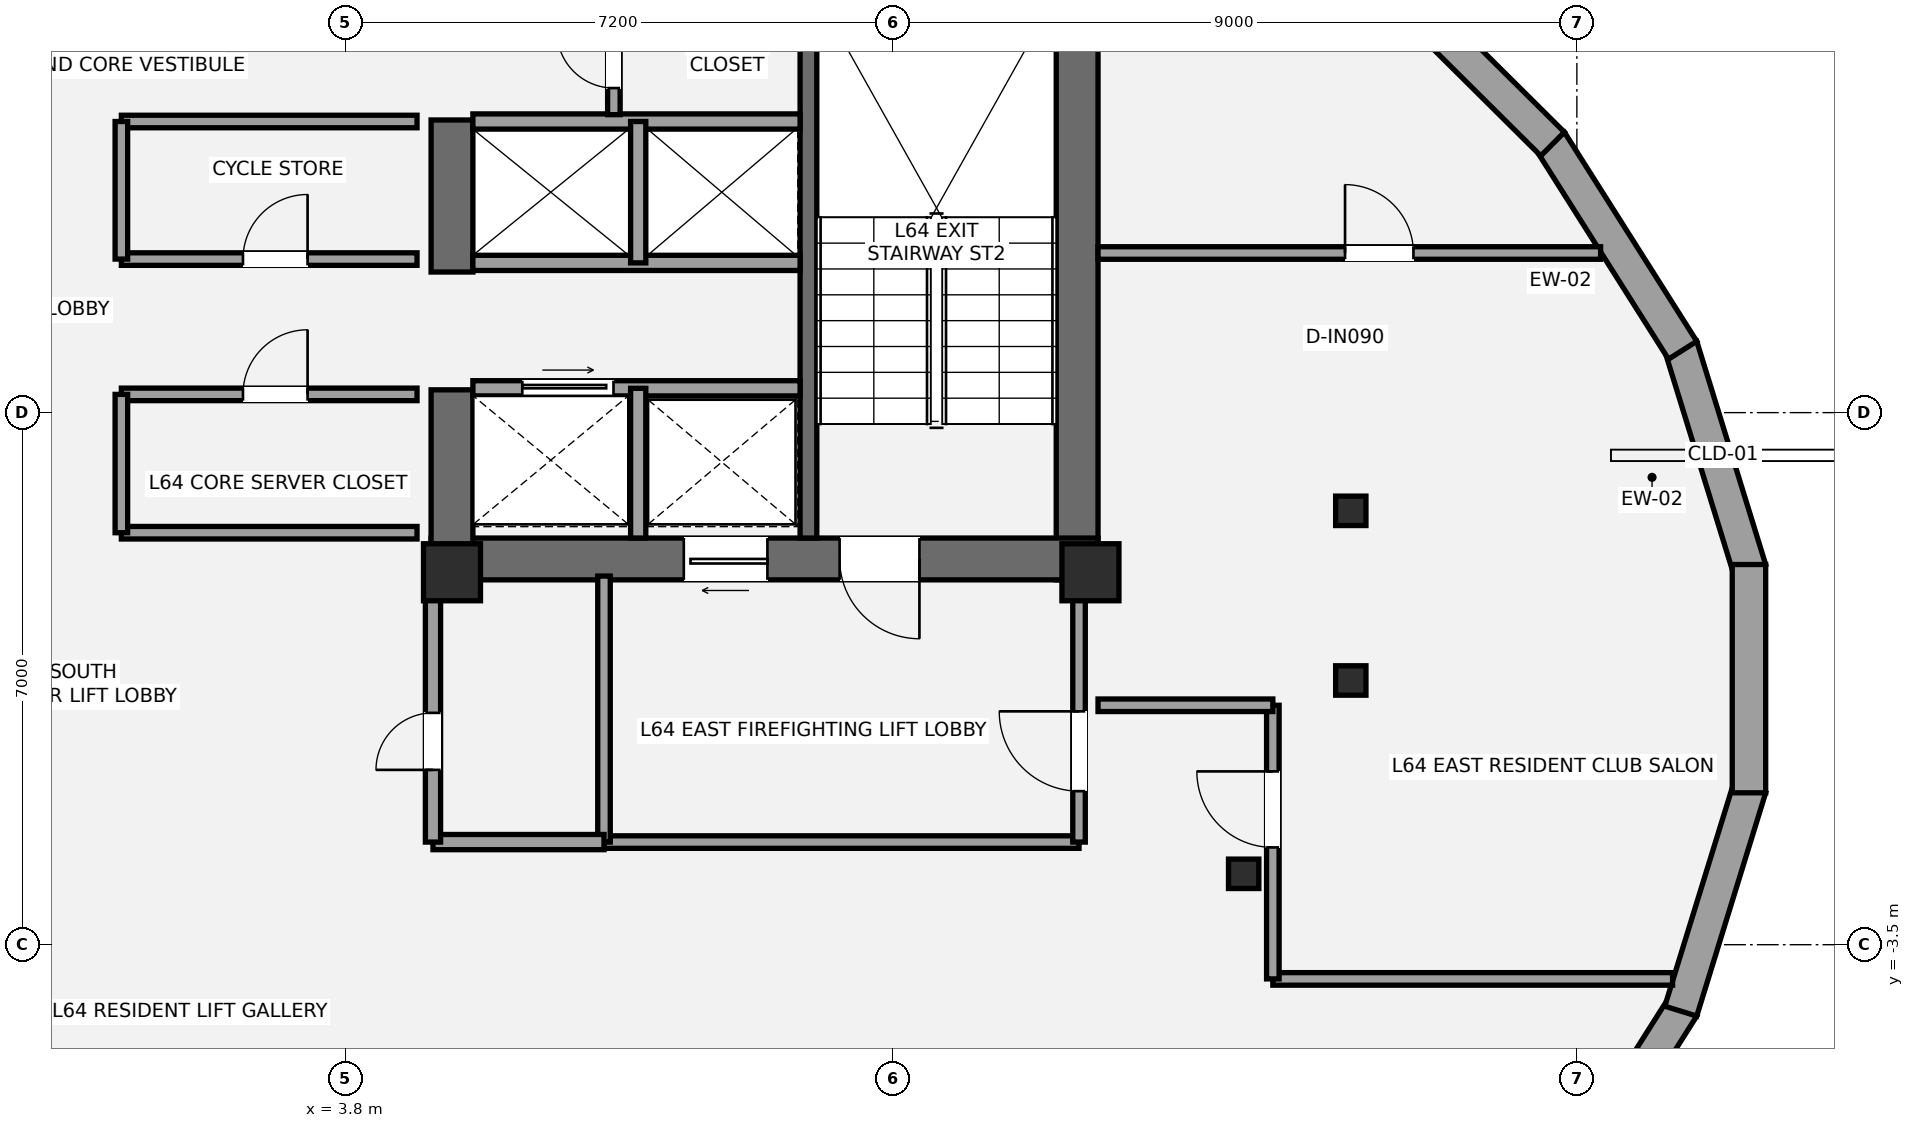
"""IFC4 building model, lengths in metres.
Left out: names, types, materials, properties, quantities, classifications, styles, units other than length and angle.
Written with IfcOpenShell. Run it as: python <this file> out.ifc"""

import sys

from ifc_helpers import new_model, si_unit, direction, frame, frame_2d, origin, origin_2d, place, context, subcontext, project, spatial, rectangle, i_section, extrude, element, fill, save


model = new_model("IFC4")
c1 = context("Model", 3, precision=1e-05, world=origin(), true_north=direction((0.0, 1.0)))
c2 = subcontext(c1, "Body", "Model", "MODEL_VIEW")
j1 = project(units=[si_unit("LENGTHUNIT", "METRE"), si_unit("PLANEANGLEUNIT", "RADIAN")], contexts=[c1])
p1 = place(None, origin())
s1 = spatial("IfcSite", under=j1, at=p1, CompositionType="ELEMENT")
p2 = place(p1, origin())
s2 = spatial("IfcBuilding", under=s1, at=p2, CompositionType="ELEMENT")
p3 = place(p2, frame((0.0, 0.0, 228.9)))
s3 = spatial("IfcBuildingStorey", under=s2, at=p3, CompositionType="ELEMENT", Elevation=228.9)
p4 = place(p3, frame((13.425, 1.3, 0.0), z_axis=(0.0, 0.0, 1.0), x_axis=(0.0, 1.0, 0.0)))
e1 = element("IfcWall", 1, at=p4, inside=s3, PredefinedType="SHEAR", context=c2, shape_type="SweptSolid", body=[
    extrude(rectangle(XDim=8.25, YDim=0.55, at=frame_2d((4.125, 0.0))), origin(), (0.0, 0.0, 1.0), 3.15),
])
p5 = place(p3, frame((13.7, 1.575, 0.0), z_axis=(0.0, 0.0, 1.0), x_axis=(-1.0, 0.0, 0.0)))
e2 = element("IfcWall", 2, at=p5, inside=s3, PredefinedType="SHEAR", context=c2, shape_type="SweptSolid", body=[
    extrude(rectangle(XDim=8.775, YDim=0.55, at=frame_2d((4.387, 0.0))), origin(), (0.0, 0.0, 1.0), 3.15),
])
p6 = place(p5, frame((2.35, 0.0, 0.0)))
e3 = element("IfcOpeningElement", 3, at=p6, cuts=e2, PredefinedType="OPENING", context=c2, shape_type="SweptSolid", body=[
    extrude(rectangle(XDim=1.05, YDim=2.15, at=frame_2d((0.525, 1.075))), frame((0.0, 0.285, 0.0), z_axis=(0.0, -1.0, 0.0), x_axis=(1.0, 0.0, 0.0)), (0.0, 0.0, 1.0), 0.57),
])
p7 = place(p5, frame((4.35, 0.0, 0.0)))
e4 = element("IfcOpeningElement", 4, at=p7, cuts=e2, PredefinedType="OPENING", context=c2, shape_type="SweptSolid", body=[
    extrude(rectangle(XDim=1.1, YDim=2.2, at=frame_2d((0.55, 1.1))), frame((0.0, 0.285, 0.0), z_axis=(0.0, -1.0, 0.0), x_axis=(1.0, 0.0, 0.0)), (0.0, 0.0, 1.0), 0.57),
])
p8 = place(p3, frame((5.2, 1.3, 0.0), z_axis=(0.0, 0.0, 1.0), x_axis=(0.0, 1.0, 0.0)))
e5 = element("IfcWall", 5, at=p8, inside=s3, PredefinedType="SHEAR", context=c2, shape_type="SweptSolid", body=[
    extrude(rectangle(XDim=2.5, YDim=0.55, at=frame_2d((1.25, 0.0))), origin(), (0.0, 0.0, 1.0), 3.15),
])
p9 = place(p3, frame((5.2, 5.35, 0.0), z_axis=(0.0, 0.0, 1.0), x_axis=(0.0, 1.0, 0.0)))
e6 = element("IfcWall", 6, at=p9, inside=s3, PredefinedType="SHEAR", context=c2, shape_type="SweptSolid", body=[
    extrude(rectangle(XDim=2.0, YDim=0.55, at=frame_2d((1.0, 0.0))), origin(), (0.0, 0.0, 1.0), 3.15),
])
p10 = place(p3, frame((9.89, 1.85, 0.0), z_axis=(0.0, 0.0, 1.0), x_axis=(0.0, 1.0, 0.0)))
e7 = element("IfcWall", 7, at=p10, inside=s3, PredefinedType="SHEAR", context=c2, shape_type="SweptSolid", body=[
    extrude(rectangle(XDim=7.15, YDim=0.22, at=frame_2d((3.575, 0.0))), origin(), (0.0, 0.0, 1.0), 3.15),
])
for number, where, z_axis, x_axis in (
    (8, (5.2, 1.4, 0.0), (0.0, 0.0, 1.0), (1.0, 0.0, 0.0)),
    (9, (13.6, 1.4, 0.0), (0.0, 0.0, 1.0), (1.0, 0.0, 0.0)),
):
    element("IfcColumn", number, at=place(p3, frame(where, z_axis=z_axis, x_axis=x_axis)), inside=s3, PredefinedType="PILASTER", context=c2, shape_type="SweptSolid", body=[
        extrude(rectangle(XDim=0.75, YDim=0.75, at=origin_2d()), origin(), (0.0, 0.0, 1.0), 3.15),
    ])
for number, where, z_axis, x_axis in (
    (10, (17.026, 2.208, 0.0), (0.0, 0.0, 1.0), (1.0, 0.0, 0.0)),
    (11, (15.616, -2.567, 0.0), (0.0, 0.0, 1.0), (1.0, 0.0, 0.0)),
    (12, (17.026, -0.024, 0.0), (0.0, 0.0, 1.0), (1.0, 0.0, 0.0)),
):
    element("IfcColumn", number, at=place(p3, frame(where, z_axis=z_axis, x_axis=x_axis)), inside=s3, PredefinedType="COLUMN", context=c2, shape_type="SweptSolid", body=[
        extrude(i_section(OverallWidth=0.399, OverallDepth=0.387, WebThickness=0.021, FlangeThickness=0.033, at=origin_2d()), origin(), (0.0, 0.0, 1.0), 3.15),
    ])
p11 = place(p3, frame((21.367, 4.374, 0.0), z_axis=(0.0, 0.0, 1.0), x_axis=(0.295012279945, -0.95549346135, 0.0)))
e13 = element("IfcWall", 13, at=p11, inside=s3, PredefinedType="STANDARD", context=c2, shape_type="SweptSolid", body=[
    extrude(rectangle(XDim=3.073, YDim=0.44, at=frame_2d((1.537, 0.0))), origin(), (0.0, 0.0, 1.0), 2.336),
])
p12 = place(p3, frame((19.65, 7.073, 0.0), z_axis=(0.0, 0.0, 1.0), x_axis=(0.53485586517, -0.844943313775, 0.0)))
e14 = element("IfcWall", 14, at=p12, inside=s3, PredefinedType="STANDARD", context=c2, shape_type="SweptSolid", body=[
    extrude(rectangle(XDim=3.256, YDim=0.44, at=frame_2d((1.628, 0.0))), origin(), (0.0, 0.0, 1.0), 2.336),
])
p13 = place(p3, frame((17.197, 9.501, 0.0), z_axis=(0.0, 0.0, 1.0), x_axis=(0.709543258305, -0.704661879623, 0.0)))
e15 = element("IfcWall", 15, at=p13, inside=s3, PredefinedType="STANDARD", context=c2, shape_type="SweptSolid", body=[
    extrude(rectangle(XDim=3.501, YDim=0.44, at=frame_2d((1.75, 0.0))), origin(), (0.0, 0.0, 1.0), 2.336),
])
p14 = place(p3, frame((21.392, -4.321, 0.0), z_axis=(0.0, 0.0, 1.0), x_axis=(-0.53485586517, -0.844943313775, 0.0)))
e16 = element("IfcWall", 16, at=p14, inside=s3, PredefinedType="STANDARD", context=c2, shape_type="SweptSolid", body=[
    extrude(rectangle(XDim=3.256, YDim=0.44, at=frame_2d((1.628, 0.0))), origin(), (0.0, 0.0, 1.0), 2.336),
])
p15 = place(p3, frame((22.274, -1.437, 0.0), z_axis=(0.0, 0.0, 1.0), x_axis=(-0.295012279945, -0.95549346135, 0.0)))
e17 = element("IfcWall", 17, at=p15, inside=s3, PredefinedType="STANDARD", context=c2, shape_type="SweptSolid", body=[
    extrude(rectangle(XDim=3.073, YDim=0.44, at=frame_2d((1.537, 0.0))), origin(), (0.0, 0.0, 1.0), 2.336),
])
p16 = place(p3, frame((22.264, 1.502, 0.0), z_axis=(0.0, 0.0, 1.0), x_axis=(0.0, -1.0, 0.0)))
e18 = element("IfcWall", 18, at=p16, inside=s3, PredefinedType="STANDARD", context=c2, shape_type="SweptSolid", body=[
    extrude(rectangle(XDim=3.003, YDim=0.44, at=frame_2d((1.502, 0.0))), origin(), (0.0, 0.0, 1.0), 2.336),
])
p17 = place(p3, frame((7.2, -2.15, 0.0), z_axis=(0.0, 0.0, 1.0), x_axis=(1.0, 0.0, 0.0)))
e19 = element("IfcWall", 19, at=p17, inside=s3, PredefinedType="PARTITIONING", context=c2, shape_type="SweptSolid", body=[
    extrude(rectangle(XDim=6.25, YDim=0.165, at=frame_2d((3.125, 0.0))), origin(), (0.0, 0.0, 1.0), 2.97),
])
p18 = place(p3, frame((7.2, -2.15, 0.0), z_axis=(0.0, 0.0, 1.0), x_axis=(0.0, 1.0, 0.0)))
e20 = element("IfcWall", 20, at=p18, inside=s3, PredefinedType="PARTITIONING", context=c2, shape_type="SweptSolid", body=[
    extrude(rectangle(XDim=3.5, YDim=0.165, at=frame_2d((1.75, 0.0))), origin(), (0.0, 0.0, 1.0), 2.423),
])
p19 = place(p3, frame((13.45, -2.15, 0.0), z_axis=(0.0, 0.0, 1.0), x_axis=(0.0, 1.0, 0.0)))
e21 = element("IfcWall", 21, at=p19, inside=s3, PredefinedType="PARTITIONING", context=c2, shape_type="SweptSolid", body=[
    extrude(rectangle(XDim=3.5, YDim=0.165, at=frame_2d((1.75, 0.0))), origin(), (0.0, 0.0, 1.0), 2.423),
])
p20 = place(p19, frame((0.67, 0.0, 0.0)))
e22 = element("IfcOpeningElement", 22, at=p20, cuts=e21, PredefinedType="OPENING", context=c2, shape_type="SweptSolid", body=[
    extrude(rectangle(XDim=1.05, YDim=2.15, at=frame_2d((0.525, 1.075))), frame((0.0, 0.093, 0.0), z_axis=(0.0, -1.0, 0.0), x_axis=(1.0, 0.0, 0.0)), (0.0, 0.0, 1.0), 0.185),
])
p21 = place(p3, frame((4.95, -2.15, 0.0), z_axis=(0.0, 0.0, 1.0), x_axis=(1.0, 0.0, 0.0)))
e23 = element("IfcWall", 23, at=p21, inside=s3, PredefinedType="SOLIDWALL", context=c2, shape_type="SweptSolid", body=[
    extrude(rectangle(XDim=2.25, YDim=0.2, at=frame_2d((1.125, 0.0))), origin(), (0.0, 0.0, 1.0), 2.97),
])
p22 = place(p3, frame((4.95, -2.15, 0.0), z_axis=(0.0, 0.0, 1.0), x_axis=(0.0, 1.0, 0.0)))
e24 = element("IfcWall", 24, at=p22, inside=s3, PredefinedType="SOLIDWALL", context=c2, shape_type="SweptSolid", body=[
    extrude(rectangle(XDim=3.5, YDim=0.2, at=frame_2d((1.75, 0.0))), origin(), (0.0, 0.0, 1.0), 2.423),
])
p23 = place(p22, frame((0.95, 0.0, 0.0)))
e25 = element("IfcOpeningElement", 25, at=p23, cuts=e24, PredefinedType="OPENING", context=c2, shape_type="SweptSolid", body=[
    extrude(rectangle(XDim=0.75, YDim=2.1, at=frame_2d((0.375, 1.05))), frame((0.0, 0.11, 0.0), z_axis=(0.0, -1.0, 0.0), x_axis=(1.0, 0.0, 0.0)), (0.0, 0.0, 1.0), 0.22),
])
p24 = place(p3, frame((5.475, 3.82, 0.0), z_axis=(0.0, 0.0, 1.0), x_axis=(1.0, 0.0, 0.0)))
e26 = element("IfcWall", 26, at=p24, inside=s3, PredefinedType="SOLIDWALL", context=c2, shape_type="SweptSolid", body=[
    extrude(rectangle(XDim=4.305, YDim=0.2, at=frame_2d((2.152, 0.0))), origin(), (0.0, 0.0, 1.0), 2.97),
])
p25 = place(p24, frame((0.65, 0.0, 0.0)))
e27 = element("IfcOpeningElement", 27, at=p25, cuts=e26, PredefinedType="OPENING", context=c2, shape_type="SweptSolid", body=[
    extrude(rectangle(XDim=1.2, YDim=2.2, at=frame_2d((0.6, 1.1))), frame((0.0, 0.11, 0.0), z_axis=(0.0, -1.0, 0.0), x_axis=(1.0, 0.0, 0.0)), (0.0, 0.0, 1.0), 0.22),
])
p26 = place(p3, frame((7.65, 1.85, 0.0), z_axis=(0.0, 0.0, 1.0), x_axis=(0.0, 1.0, 0.0)))
e28 = element("IfcWall", 28, at=p26, inside=s3, PredefinedType="SOLIDWALL", context=c2, shape_type="SweptSolid", body=[
    extrude(rectangle(XDim=1.97, YDim=0.2, at=frame_2d((0.985, 0.0))), origin(), (0.0, 0.0, 1.0), 2.97),
])
for number, where, z_axis, x_axis in (
    (29, (5.475, 5.47, 0.0), (0.0, 0.0, 1.0), (1.0, 0.0, 0.0)),
    (30, (5.475, 7.33, 0.0), (0.0, 0.0, 1.0), (1.0, 0.0, 0.0)),
):
    element("IfcWall", number, at=place(p3, frame(where, z_axis=z_axis, x_axis=x_axis)), inside=s3, PredefinedType="SOLIDWALL", context=c2, shape_type="SweptSolid", body=[
        extrude(rectangle(XDim=4.305, YDim=0.2, at=frame_2d((2.152, 0.0))), origin(), (0.0, 0.0, 1.0), 2.97),
    ])
p27 = place(p3, frame((7.65, 5.47, 0.0), z_axis=(0.0, 0.0, 1.0), x_axis=(0.0, 1.0, 0.0)))
e31 = element("IfcWall", 31, at=p27, inside=s3, PredefinedType="SOLIDWALL", context=c2, shape_type="SweptSolid", body=[
    extrude(rectangle(XDim=1.86, YDim=0.2, at=frame_2d((0.93, 0.0))), origin(), (0.0, 0.0, 1.0), 2.97),
])
p28 = place(p3, frame((0.85, 1.92, 0.0), z_axis=(0.0, 0.0, 1.0), x_axis=(1.0, 0.0, 0.0)))
e32 = element("IfcWall", 32, at=p28, inside=s3, PredefinedType="PARTITIONING", context=c2, shape_type="SweptSolid", body=[
    extrude(rectangle(XDim=3.89, YDim=0.165, at=frame_2d((1.945, 0.0))), origin(), (0.0, 0.0, 1.0), 2.11),
])
p29 = place(p3, frame((0.85, 3.74, 0.0), z_axis=(0.0, 0.0, 1.0), x_axis=(1.0, 0.0, 0.0)))
e33 = element("IfcWall", 33, at=p29, inside=s3, PredefinedType="PARTITIONING", context=c2, shape_type="SweptSolid", body=[
    extrude(rectangle(XDim=3.89, YDim=0.165, at=frame_2d((1.945, 0.0))), origin(), (0.0, 0.0, 1.0), 2.97),
])
p30 = place(p29, frame((1.6, 0.0, 0.0)))
e34 = element("IfcOpeningElement", 34, at=p30, cuts=e33, PredefinedType="OPENING", context=c2, shape_type="SweptSolid", body=[
    extrude(rectangle(XDim=0.85, YDim=2.1, at=frame_2d((0.425, 1.05))), frame((0.0, 0.093, 0.0), z_axis=(0.0, -1.0, 0.0), x_axis=(1.0, 0.0, 0.0)), (0.0, 0.0, 1.0), 0.185),
])
p31 = place(p3, frame((0.85, 1.92, 0.0), z_axis=(0.0, 0.0, 1.0), x_axis=(0.0, 1.0, 0.0)))
e35 = element("IfcWall", 35, at=p31, inside=s3, PredefinedType="PARTITIONING", context=c2, shape_type="SweptSolid", body=[
    extrude(rectangle(XDim=1.82, YDim=0.165, at=frame_2d((0.91, 0.0))), origin(), (0.0, 0.0, 1.0), 2.97),
])
p32 = place(p3, frame((0.85, 5.52, 0.0), z_axis=(0.0, 0.0, 1.0), x_axis=(1.0, 0.0, 0.0)))
e36 = element("IfcWall", 36, at=p32, inside=s3, PredefinedType="PARTITIONING", context=c2, shape_type="SweptSolid", body=[
    extrude(rectangle(XDim=3.89, YDim=0.165, at=frame_2d((1.945, 0.0))), origin(), (0.0, 0.0, 1.0), 2.97),
])
p33 = place(p32, frame((1.6, 0.0, 0.0)))
e37 = element("IfcOpeningElement", 37, at=p33, cuts=e36, PredefinedType="OPENING", context=c2, shape_type="SweptSolid", body=[
    extrude(rectangle(XDim=0.85, YDim=2.1, at=frame_2d((0.425, 1.05))), frame((0.0, 0.093, 0.0), z_axis=(0.0, -1.0, 0.0), x_axis=(1.0, 0.0, 0.0)), (0.0, 0.0, 1.0), 0.185),
])
p34 = place(p3, frame((0.85, 7.33, 0.0), z_axis=(0.0, 0.0, 1.0), x_axis=(1.0, 0.0, 0.0)))
e38 = element("IfcWall", 38, at=p34, inside=s3, PredefinedType="PARTITIONING", context=c2, shape_type="SweptSolid", body=[
    extrude(rectangle(XDim=3.89, YDim=0.165, at=frame_2d((1.945, 0.0))), origin(), (0.0, 0.0, 1.0), 2.97),
])
p35 = place(p3, frame((0.85, 5.52, 0.0), z_axis=(0.0, 0.0, 1.0), x_axis=(0.0, 1.0, 0.0)))
e39 = element("IfcWall", 39, at=p35, inside=s3, PredefinedType="PARTITIONING", context=c2, shape_type="SweptSolid", body=[
    extrude(rectangle(XDim=1.81, YDim=0.165, at=frame_2d((0.905, 0.0))), origin(), (0.0, 0.0, 1.0), 2.97),
])
p36 = place(p3, frame((7.33, 7.42, 0.0), z_axis=(0.0, 0.0, 1.0), x_axis=(0.0, 1.0, 0.0)))
e40 = element("IfcWall", 40, at=p36, inside=s3, PredefinedType="PARTITIONING", context=c2, shape_type="SweptSolid", body=[
    extrude(rectangle(XDim=1.58, YDim=0.165, at=frame_2d((0.79, 0.0))), origin(), (0.0, 0.0, 1.0), 2.97),
])
p37 = place(p36, frame((0.35, 0.0, 0.0)))
e41 = element("IfcOpeningElement", 41, at=p37, cuts=e40, PredefinedType="OPENING", context=c2, shape_type="SweptSolid", body=[
    extrude(rectangle(XDim=0.75, YDim=2.1, at=frame_2d((0.375, 1.05))), frame((0.0, 0.093, 0.0), z_axis=(0.0, -1.0, 0.0), x_axis=(1.0, 0.0, 0.0)), (0.0, 0.0, 1.0), 0.185),
])
p38 = place(p3, frame((16.0, -3.95, 0.0), z_axis=(0.0, 0.0, 1.0), x_axis=(1.0, 0.0, 0.0)))
e42 = element("IfcWall", 42, at=p38, inside=s3, PredefinedType="PARTITIONING", context=c2, shape_type="SweptSolid", body=[
    extrude(rectangle(XDim=5.26, YDim=0.165, at=frame_2d((2.63, 0.0))), origin(), (0.0, 0.0, 1.0), 2.423),
])
p39 = place(p3, frame((16.0, -3.95, 0.0), z_axis=(0.0, 0.0, 1.0), x_axis=(0.0, 1.0, 0.0)))
e43 = element("IfcWall", 43, at=p39, inside=s3, PredefinedType="PARTITIONING", context=c2, shape_type="SweptSolid", body=[
    extrude(rectangle(XDim=3.6, YDim=0.165, at=frame_2d((1.8, 0.0))), origin(), (0.0, 0.0, 1.0), 2.357),
])
p40 = place(p39, frame((1.73, 0.0, 0.0)))
e44 = element("IfcOpeningElement", 44, at=p40, cuts=e43, PredefinedType="OPENING", context=c2, shape_type="SweptSolid", body=[
    extrude(rectangle(XDim=1.0, YDim=2.15, at=frame_2d((0.5, 1.075))), frame((0.0, 0.093, 0.0), z_axis=(0.0, -1.0, 0.0), x_axis=(1.0, 0.0, 0.0)), (0.0, 0.0, 1.0), 0.185),
])
p41 = place(p3, frame((13.7, -0.35, 0.0), z_axis=(0.0, 0.0, 1.0), x_axis=(1.0, 0.0, 0.0)))
e45 = element("IfcWall", 45, at=p41, inside=s3, PredefinedType="PARTITIONING", context=c2, shape_type="SweptSolid", body=[
    extrude(rectangle(XDim=2.3, YDim=0.165, at=frame_2d((1.15, 0.0))), origin(), (0.0, 0.0, 1.0), 2.423),
])
p42 = place(p3, frame((13.7, 5.6, 0.0), z_axis=(0.0, 0.0, 1.0), x_axis=(1.0, 0.0, 0.0)))
e46 = element("IfcWall", 46, at=p42, inside=s3, PredefinedType="PARTITIONING", context=c2, shape_type="SweptSolid", body=[
    extrude(rectangle(XDim=6.612, YDim=0.165, at=frame_2d((3.306, 0.0))), origin(), (0.0, 0.0, 1.0), 2.423),
])
p43 = place(p42, frame((3.25, 0.0, 0.0)))
e47 = element("IfcOpeningElement", 47, at=p43, cuts=e46, PredefinedType="OPENING", context=c2, shape_type="SweptSolid", body=[
    extrude(rectangle(XDim=0.9, YDim=2.1, at=frame_2d((0.45, 1.05))), frame((0.0, 0.093, 0.0), z_axis=(0.0, -1.0, 0.0), x_axis=(1.0, 0.0, 0.0)), (0.0, 0.0, 1.0), 0.185),
])
p44 = place(p6, origin())
e48 = element("IfcDoor", 48, at=p44, inside=s3, OperationType="SINGLE_SWING_LEFT", PredefinedType="DOOR", context=c2, shape_type="SweptSolid", body=[
    extrude(rectangle(XDim=1.05, YDim=2.15, at=frame_2d((0.525, 1.075))), frame((0.0, 0.025, 0.0), z_axis=(0.0, -1.0, 0.0), x_axis=(1.0, 0.0, 0.0)), (0.0, 0.0, 1.0), 0.05),
])
fill(e3, e48)
p45 = place(p20, origin())
e49 = element("IfcDoor", 49, at=p45, inside=s3, OperationType="SINGLE_SWING_RIGHT", PredefinedType="DOOR", context=c2, shape_type="SweptSolid", body=[
    extrude(rectangle(XDim=1.05, YDim=2.15, at=frame_2d((0.525, 1.075))), frame((0.0, 0.025, 0.0), z_axis=(0.0, -1.0, 0.0), x_axis=(1.0, 0.0, 0.0)), (0.0, 0.0, 1.0), 0.05),
])
fill(e22, e49)
p46 = place(p23, origin())
e50 = element("IfcDoor", 50, at=p46, inside=s3, OperationType="SINGLE_SWING_LEFT", PredefinedType="DOOR", context=c2, shape_type="SweptSolid", body=[
    extrude(rectangle(XDim=0.75, YDim=2.1, at=frame_2d((0.375, 1.05))), frame((0.0, 0.025, 0.0), z_axis=(0.0, -1.0, 0.0), x_axis=(1.0, 0.0, 0.0)), (0.0, 0.0, 1.0), 0.05),
])
fill(e25, e50)
p47 = place(p7, origin())
e51 = element("IfcDoor", 51, at=p47, inside=s3, OperationType="SLIDING_TO_LEFT", PredefinedType="DOOR", context=c2, shape_type="SweptSolid", body=[
    extrude(rectangle(XDim=1.1, YDim=2.2, at=frame_2d((0.55, 1.1))), frame((0.0, 0.025, 0.0), z_axis=(0.0, -1.0, 0.0), x_axis=(1.0, 0.0, 0.0)), (0.0, 0.0, 1.0), 0.05),
])
fill(e4, e51)
p48 = place(p25, origin())
e52 = element("IfcDoor", 52, at=p48, inside=s3, OperationType="SLIDING_TO_RIGHT", PredefinedType="DOOR", context=c2, shape_type="SweptSolid", body=[
    extrude(rectangle(XDim=1.2, YDim=2.2, at=frame_2d((0.6, 1.1))), frame((0.0, 0.025, 0.0), z_axis=(0.0, -1.0, 0.0), x_axis=(1.0, 0.0, 0.0)), (0.0, 0.0, 1.0), 0.05),
])
fill(e27, e52)
p49 = place(p30, origin())
e53 = element("IfcDoor", 53, at=p49, inside=s3, OperationType="SINGLE_SWING_RIGHT", PredefinedType="DOOR", context=c2, shape_type="SweptSolid", body=[
    extrude(rectangle(XDim=0.85, YDim=2.1, at=frame_2d((0.425, 1.05))), frame((0.0, 0.025, 0.0), z_axis=(0.0, -1.0, 0.0), x_axis=(1.0, 0.0, 0.0)), (0.0, 0.0, 1.0), 0.05),
])
fill(e34, e53)
p50 = place(p33, origin())
e54 = element("IfcDoor", 54, at=p50, inside=s3, OperationType="SINGLE_SWING_RIGHT", PredefinedType="DOOR", context=c2, shape_type="SweptSolid", body=[
    extrude(rectangle(XDim=0.85, YDim=2.1, at=frame_2d((0.425, 1.05))), frame((0.0, 0.025, 0.0), z_axis=(0.0, -1.0, 0.0), x_axis=(1.0, 0.0, 0.0)), (0.0, 0.0, 1.0), 0.05),
])
fill(e37, e54)
p51 = place(p37, origin())
e55 = element("IfcDoor", 55, at=p51, inside=s3, OperationType="SINGLE_SWING_RIGHT", PredefinedType="DOOR", context=c2, shape_type="SweptSolid", body=[
    extrude(rectangle(XDim=0.75, YDim=2.1, at=frame_2d((0.375, 1.05))), frame((0.0, 0.025, 0.0), z_axis=(0.0, -1.0, 0.0), x_axis=(1.0, 0.0, 0.0)), (0.0, 0.0, 1.0), 0.05),
])
fill(e41, e55)
p52 = place(p40, origin())
e56 = element("IfcDoor", 56, at=p52, inside=s3, OperationType="SINGLE_SWING_RIGHT", PredefinedType="DOOR", context=c2, shape_type="SweptSolid", body=[
    extrude(rectangle(XDim=1.0, YDim=2.15, at=frame_2d((0.5, 1.075))), frame((0.0, 0.025, 0.0), z_axis=(0.0, -1.0, 0.0), x_axis=(1.0, 0.0, 0.0)), (0.0, 0.0, 1.0), 0.05),
])
fill(e44, e56)
p53 = place(p43, origin())
e57 = element("IfcDoor", 57, at=p53, inside=s3, OperationType="SINGLE_SWING_LEFT", PredefinedType="DOOR", context=c2, shape_type="SweptSolid", body=[
    extrude(rectangle(XDim=0.9, YDim=2.1, at=frame_2d((0.45, 1.05))), frame((0.0, 0.025, 0.0), z_axis=(0.0, -1.0, 0.0), x_axis=(1.0, 0.0, 0.0)), (0.0, 0.0, 1.0), 0.05),
])
fill(e47, e57)
save(model, sys.argv[1])
